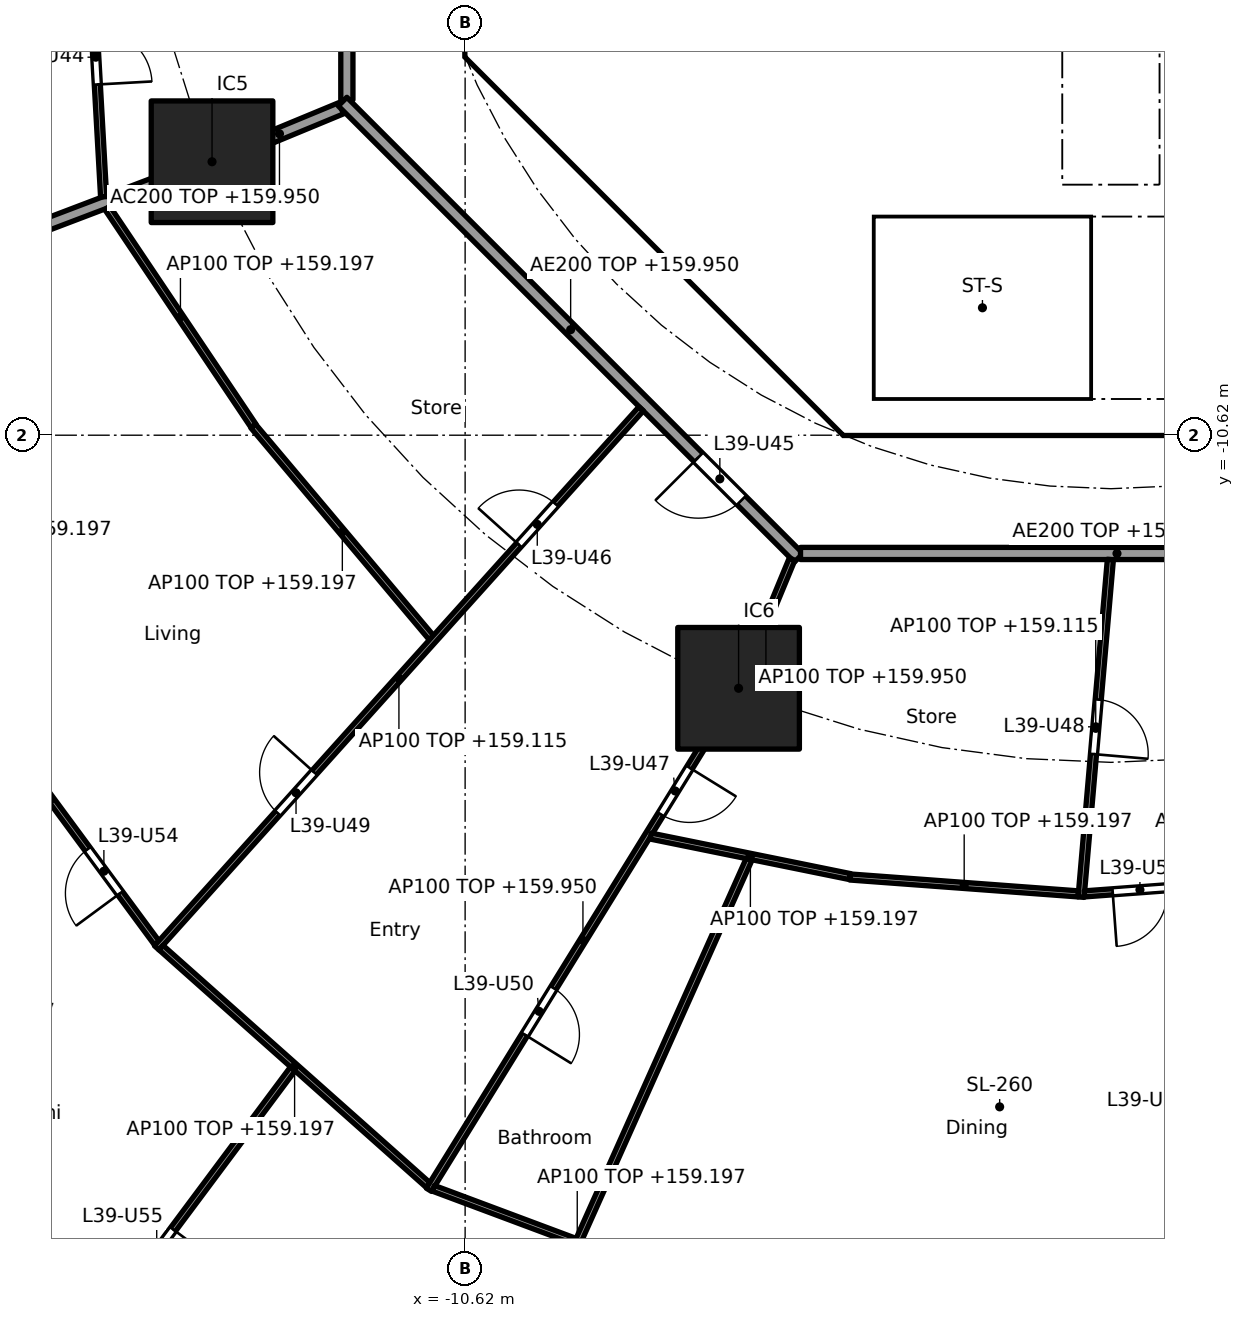
"""IFC4 building model, lengths in metres.
Left out: names, types, materials, properties, quantities, classifications, styles, units other than length and angle.
Written with IfcOpenShell. Run it as: python <this file> out.ifc"""

import sys

from ifc_helpers import new_model, si_unit, direction, frame, frame_2d, origin, origin_2d, place, context, subcontext, project, spatial, polyline, rectangle, outline, extrude, element, fill, save


model = new_model("IFC4")
c1 = context("Model", 3, precision=1e-05, world=origin(), true_north=direction((0.0, 1.0)))
c2 = subcontext(c1, "Body", "Model", "MODEL_VIEW")
j1 = project(units=[si_unit("LENGTHUNIT", "METRE"), si_unit("PLANEANGLEUNIT", "RADIAN")], contexts=[c1])
p1 = place(None, origin())
s1 = spatial("IfcSite", under=j1, at=p1, CompositionType="ELEMENT")
p2 = place(p1, origin())
s2 = spatial("IfcBuilding", under=s1, at=p2, CompositionType="ELEMENT")
p3 = place(p2, frame((0.0, 0.0, 156.6)))
s3 = spatial("IfcBuildingStorey", under=s2, at=p3, CompositionType="ELEMENT", Elevation=156.6)
for number, where, z_axis, x_axis in (
    (1, (-14.782, -6.123, 0.0), (0.0, 0.0, 1.0), (1.0, 0.0, 0.0)),
    (2, (-6.123, -14.782, 0.0), (0.0, 0.0, 1.0), (1.0, 0.0, 0.0)),
):
    element("IfcColumn", number, at=place(p3, frame(where, z_axis=z_axis, x_axis=x_axis)), inside=s3, PredefinedType="COLUMN", context=c2, shape_type="SweptSolid", body=[
        extrude(rectangle(XDim=2.0, YDim=2.0, at=origin_2d()), origin(), (0.0, 0.0, 1.0), 3.7),
    ])
p4 = place(p3, frame((-9.988, -4.613, 0.0), z_axis=(0.0, 0.0, 1.0), x_axis=(0.707106781187, -0.707106781187, 0.0)))
e3 = element("IfcWall", 3, at=p4, inside=s3, PredefinedType="SHEAR", context=c2, shape_type="SweptSolid", body=[
    extrude(rectangle(XDim=7.602, YDim=0.6, at=frame_2d((3.801, 0.0))), origin(), (0.0, 0.0, 1.0), 3.35),
])
p5 = place(p4, frame((6.151, 0.0, 0.0)))
e4 = element("IfcOpeningElement", 4, at=p5, cuts=e3, PredefinedType="OPENING", context=c2, shape_type="SweptSolid", body=[
    extrude(rectangle(XDim=1.1, YDim=2.1, at=frame_2d((0.55, 1.05))), frame((0.0, 0.31, 0.0), z_axis=(0.0, -1.0, 0.0), x_axis=(1.0, 0.0, 0.0)), (0.0, 0.0, 1.0), 0.62),
])
p6 = place(p3, frame((-7.4, -6.627, 0.0), z_axis=(0.0, 0.0, 1.0), x_axis=(0.0, 1.0, 0.0)))
e5 = element("IfcWall", 5, at=p6, inside=s3, PredefinedType="PARTITIONING", context=c2, shape_type="SweptSolid", body=[
    extrude(rectangle(XDim=2.527, YDim=0.15, at=frame_2d((1.263, 0.0))), origin(), (0.0, 0.0, 1.0), 3.35),
])
p7 = place(p6, frame((0.776, 0.0, 0.0)))
e6 = element("IfcOpeningElement", 6, at=p7, cuts=e5, PredefinedType="OPENING", context=c2, shape_type="SweptSolid", body=[
    extrude(rectangle(XDim=0.9, YDim=2.1, at=frame_2d((0.45, 1.05))), frame((0.0, 0.085, 0.0), z_axis=(0.0, -1.0, 0.0), x_axis=(1.0, 0.0, 0.0)), (0.0, 0.0, 1.0), 0.17),
])
p8 = place(p3, frame((-4.0, -6.5, 0.0), z_axis=(0.0, 0.0, 1.0), x_axis=(0.0, 1.0, 0.0)))
e7 = element("IfcWall", 7, at=p8, inside=s3, PredefinedType="SOLIDWALL", context=c2, shape_type="SweptSolid", body=[
    extrude(rectangle(XDim=2.2, YDim=0.2, at=frame_2d((1.1, 0.0))), origin(), (0.0, 0.0, 1.0), 3.35),
])
p9 = place(p8, frame((0.65, 0.0, 0.0)))
e8 = element("IfcOpeningElement", 8, at=p9, cuts=e7, PredefinedType="OPENING", context=c2, shape_type="SweptSolid", body=[
    extrude(rectangle(XDim=0.9, YDim=2.1, at=frame_2d((0.45, 1.05))), frame((0.0, 0.11, 0.0), z_axis=(0.0, -1.0, 0.0), x_axis=(1.0, 0.0, 0.0)), (0.0, 0.0, 1.0), 0.22),
])
p10 = place(p3, origin())
e9 = element("IfcWall", 9, at=p10, inside=s3, PredefinedType="SHEAR", context=c2, shape_type="SweptSolid", body=[
    extrude(outline(polyline([(-10.625, -3.801), (-10.025, -3.801), (-10.025, -4.152), (-9.776, -4.401), (-10.2, -4.825), (-10.625, -4.401), (-10.625, -3.801)])), origin(), (0.0, 0.0, 1.0), 3.35),
])
p11 = place(p3, origin())
e10 = element("IfcWall", 10, at=p11, inside=s3, PredefinedType="SHEAR", context=c2, shape_type="SweptSolid", body=[
    extrude(outline(polyline([(-4.152, -10.025), (4.152, -10.025), (4.401, -9.776), (4.825, -10.2), (4.401, -10.625), (-4.401, -10.625), (-4.825, -10.2), (-4.401, -9.776), (-4.152, -10.025)])), origin(), (0.0, 0.0, 1.0), 3.35),
])
for number, where, z_axis, x_axis in (
    (11, (-0.9, -6.5, 0.0), (0.0, 0.0, 1.0), (0.0, 1.0, 0.0)),
    (12, (0.9, -6.5, 0.0), (0.0, 0.0, 1.0), (0.0, 1.0, 0.0)),
):
    element("IfcWall", number, at=place(p3, frame(where, z_axis=z_axis, x_axis=x_axis)), inside=s3, PredefinedType="SOLIDWALL", context=c2, shape_type="SweptSolid", body=[
        extrude(rectangle(XDim=2.2, YDim=0.2, at=frame_2d((1.1, 0.0))), origin(), (0.0, 0.0, 1.0), 3.35),
    ])
p12 = place(p3, origin())
e13 = element("IfcWall", 13, at=p12, inside=s3, PredefinedType="SOLIDWALL", context=c2, shape_type="SweptSolid", body=[
    extrude(outline(polyline([(-3.9, -10.025), (-4.1, -10.025), (-4.1, -7.025), (-3.9, -7.025), (-3.9, -10.025)])), origin(), (0.0, 0.0, 1.0), 3.35),
])
p13 = place(p3, origin())
e14 = element("IfcWall", 14, at=p13, inside=s3, PredefinedType="SOLIDWALL", context=c2, shape_type="SweptSolid", body=[
    extrude(outline(polyline([(4.1, -7.025), (-4.1, -7.025), (-4.1, -6.5), (4.1, -6.5), (4.1, -7.025)])), origin(), (0.0, 0.0, 1.0), 3.35),
])
p14 = place(p3, frame((-12.657, -5.243, 0.0), z_axis=(0.0, 0.0, 1.0), x_axis=(-0.923859888513, -0.38273085373, 0.0)))
e15 = element("IfcWall", 15, at=p14, inside=s3, PredefinedType="PARTITIONING", context=c2, shape_type="SweptSolid", body=[
    extrude(rectangle(XDim=2.199, YDim=0.2, at=frame_2d((1.1, 0.0))), origin(), (0.0, 0.0, 1.0), 3.35),
])
p15 = place(p3, frame((-14.829, -6.141, 0.0), z_axis=(0.0, 0.0, 1.0), x_axis=(-0.93470181966, -0.355432846433, 0.0)))
e16 = element("IfcWall", 16, at=p15, inside=s3, PredefinedType="PARTITIONING", context=c2, shape_type="SweptSolid", body=[
    extrude(rectangle(XDim=12.438, YDim=0.2, at=frame_2d((6.219, 0.0))), origin(), (0.0, 0.0, 1.0), 2.597),
])
p16 = place(p3, frame((-12.565, 5.304, 0.0), z_axis=(0.0, 0.0, 1.0), x_axis=(0.0, -1.0, 0.0)))
e17 = element("IfcWall", 17, at=p16, inside=s3, PredefinedType="PARTITIONING", context=c2, shape_type="SweptSolid", body=[
    extrude(rectangle(XDim=10.409, YDim=0.2, at=frame_2d((5.205, 0.0))), origin(), (0.0, 0.0, 1.0), 3.35),
])
p17 = place(p3, frame((-12.635, -5.134, 0.0), z_axis=(0.0, 0.0, 1.0), x_axis=(0.707106781187, -0.707106781187, 0.0)))
e18 = element("IfcWall", 18, at=p17, inside=s3, PredefinedType="PARTITIONING", context=c2, shape_type="SweptSolid", body=[
    extrude(rectangle(XDim=10.609, YDim=0.2, at=frame_2d((5.305, 0.0))), origin(), (0.0, 0.0, 1.0), 3.35),
])
p18 = place(p17, frame((8.274, 0.0, 0.0)))
e19 = element("IfcOpeningElement", 19, at=p18, cuts=e18, PredefinedType="OPENING", context=c2, shape_type="SweptSolid", body=[
    extrude(rectangle(XDim=1.0, YDim=2.1, at=frame_2d((0.5, 1.05))), frame((0.0, 0.11, 0.0), z_axis=(0.0, -1.0, 0.0), x_axis=(1.0, 0.0, 0.0)), (0.0, 0.0, 1.0), 0.22),
])
p19 = place(p3, frame((-5.104, -12.565, 0.0), z_axis=(0.0, 0.0, 1.0), x_axis=(1.0, 0.0, 0.0)))
e20 = element("IfcWall", 20, at=p19, inside=s3, PredefinedType="PARTITIONING", context=c2, shape_type="SweptSolid", body=[
    extrude(rectangle(XDim=10.409, YDim=0.2, at=frame_2d((5.205, 0.0))), origin(), (0.0, 0.0, 1.0), 3.35),
])
p20 = place(p3, frame((-16.825, -2.058, 0.0), z_axis=(0.0, 0.0, 1.0), x_axis=(0.055993664681, -0.998431124072, 0.0)))
e21 = element("IfcWall", 21, at=p20, inside=s3, PredefinedType="PARTITIONING", context=c2, shape_type="SweptSolid", body=[
    extrude(rectangle(XDim=4.648, YDim=0.1, at=frame_2d((2.324, 0.0))), origin(), (0.0, 0.0, 1.0), 2.597),
])
p21 = place(p20, frame((1.899, 0.0, 0.0)))
e22 = element("IfcOpeningElement", 22, at=p21, cuts=e21, PredefinedType="OPENING", context=c2, shape_type="SweptSolid", body=[
    extrude(rectangle(XDim=0.9, YDim=2.1, at=frame_2d((0.45, 1.05))), frame((0.0, 0.06, 0.0), z_axis=(0.0, -1.0, 0.0), x_axis=(1.0, 0.0, 0.0)), (0.0, 0.0, 1.0), 0.12),
])
p22 = place(p3, frame((-16.504, -6.882, 0.0), z_axis=(0.0, 0.0, 1.0), x_axis=(0.556995256876, -0.830515673433, 0.0)))
e23 = element("IfcWall", 23, at=p22, inside=s3, PredefinedType="PARTITIONING", context=c2, shape_type="SweptSolid", body=[
    extrude(rectangle(XDim=4.317, YDim=0.1, at=frame_2d((2.158, 0.0))), origin(), (0.0, 0.0, 1.0), 2.597),
])
p23 = place(p3, frame((-14.104, -10.47, 0.0), z_axis=(0.0, 0.0, 1.0), x_axis=(0.644051444483, -0.764982180746, 0.0)))
e24 = element("IfcWall", 24, at=p23, inside=s3, PredefinedType="PARTITIONING", context=c2, shape_type="SweptSolid", body=[
    extrude(rectangle(XDim=4.548, YDim=0.1, at=frame_2d((2.274, 0.0))), origin(), (0.0, 0.0, 1.0), 2.597),
])
p24 = place(p3, frame((-19.176, -14.244, 0.0), z_axis=(0.0, 0.0, 1.0), x_axis=(0.593532053206, -0.80481035146, 0.0)))
e25 = element("IfcWall", 25, at=p24, inside=s3, PredefinedType="PARTITIONING", context=c2, shape_type="SweptSolid", body=[
    extrude(rectangle(XDim=5.876, YDim=0.1, at=frame_2d((2.938, 0.0))), origin(), (0.0, 0.0, 1.0), 2.597),
])
p25 = place(p24, frame((3.957, 0.0, 0.0)))
e26 = element("IfcOpeningElement", 26, at=p25, cuts=e25, PredefinedType="OPENING", context=c2, shape_type="SweptSolid", body=[
    extrude(rectangle(XDim=0.9, YDim=2.1, at=frame_2d((0.45, 1.05))), frame((0.0, 0.06, 0.0), z_axis=(0.0, -1.0, 0.0), x_axis=(1.0, 0.0, 0.0)), (0.0, 0.0, 1.0), 0.12),
])
p26 = place(p3, frame((-7.725, -10.186, 0.0), z_axis=(0.0, 0.0, 1.0), x_axis=(-0.668498346565, -0.743713628112, 0.0)))
e27 = element("IfcWall", 27, at=p26, inside=s3, PredefinedType="PARTITIONING", context=c2, shape_type="SweptSolid", body=[
    extrude(rectangle(XDim=11.919, YDim=0.1, at=frame_2d((5.959, 0.0))), origin(), (0.0, 0.0, 1.0), 2.515),
])
p27 = place(p26, frame((2.106, 0.0, 0.0)))
e28 = element("IfcOpeningElement", 28, at=p27, cuts=e27, PredefinedType="OPENING", context=c2, shape_type="SweptSolid", body=[
    extrude(rectangle(XDim=0.9, YDim=2.1, at=frame_2d((0.45, 1.05))), frame((0.0, 0.06, 0.0), z_axis=(0.0, -1.0, 0.0), x_axis=(1.0, 0.0, 0.0)), (0.0, 0.0, 1.0), 0.12),
])
p28 = place(p26, frame((8.041, 0.0, 0.0)))
e29 = element("IfcOpeningElement", 29, at=p28, cuts=e27, PredefinedType="OPENING", context=c2, shape_type="SweptSolid", body=[
    extrude(rectangle(XDim=0.9, YDim=2.1, at=frame_2d((0.45, 1.05))), frame((0.0, 0.06, 0.0), z_axis=(0.0, -1.0, 0.0), x_axis=(1.0, 0.0, 0.0)), (0.0, 0.0, 1.0), 0.12),
])
p29 = place(p3, frame((-15.622, -19.046, 0.0), z_axis=(0.0, 0.0, 1.0), x_axis=(0.747342891849, -0.664438561496, 0.0)))
e30 = element("IfcWall", 30, at=p29, inside=s3, PredefinedType="PARTITIONING", context=c2, shape_type="SweptSolid", body=[
    extrude(rectangle(XDim=5.881, YDim=0.1, at=frame_2d((2.94, 0.0))), origin(), (0.0, 0.0, 1.0), 2.597),
])
p30 = place(p3, frame((-13.454, -21.04, 0.0), z_axis=(0.0, 0.0, 1.0), x_axis=(-0.597848033124, -0.801609461826, 0.0)))
e31 = element("IfcWall", 31, at=p30, inside=s3, PredefinedType="PARTITIONING", context=c2, shape_type="SweptSolid", body=[
    extrude(rectangle(XDim=7.486, YDim=0.1, at=frame_2d((3.743, 0.0))), origin(), (0.0, 0.0, 1.0), 2.747),
])
p31 = place(p30, frame((3.293, 0.0, 0.0)))
e32 = element("IfcOpeningElement", 32, at=p31, cuts=e31, PredefinedType="OPENING", context=c2, shape_type="SweptSolid", body=[
    extrude(rectangle(XDim=0.9, YDim=2.1, at=frame_2d((0.45, 1.05))), frame((0.0, 0.06, 0.0), z_axis=(0.0, -1.0, 0.0), x_axis=(1.0, 0.0, 0.0)), (0.0, 0.0, 1.0), 0.12),
])
p32 = place(p3, frame((-5.243, -12.657, 0.0), z_axis=(0.0, 0.0, 1.0), x_axis=(-0.382811769845, -0.923826362943, 0.0)))
e33 = element("IfcWall", 33, at=p32, inside=s3, PredefinedType="PARTITIONING", context=c2, shape_type="SweptSolid", body=[
    extrude(rectangle(XDim=2.25, YDim=0.1, at=frame_2d((1.125, 0.0))), origin(), (0.0, 0.0, 1.0), 3.35),
])
p33 = place(p3, frame((-6.149, -14.825, 0.0), z_axis=(0.0, 0.0, 1.0), x_axis=(-0.525396393596, -0.850857584791, 0.0)))
e34 = element("IfcWall", 34, at=p33, inside=s3, PredefinedType="PARTITIONING", context=c2, shape_type="SweptSolid", body=[
    extrude(rectangle(XDim=9.643, YDim=0.1, at=frame_2d((4.822, 0.0))), origin(), (0.0, 0.0, 1.0), 3.35),
])
p34 = place(p33, frame((1.485, 0.0, 0.0)))
e35 = element("IfcOpeningElement", 35, at=p34, cuts=e34, PredefinedType="OPENING", context=c2, shape_type="SweptSolid", body=[
    extrude(rectangle(XDim=0.9, YDim=2.1, at=frame_2d((0.45, 1.05))), frame((0.0, 0.06, 0.0), z_axis=(0.0, -1.0, 0.0), x_axis=(1.0, 0.0, 0.0)), (0.0, 0.0, 1.0), 0.12),
])
p35 = place(p33, frame((5.744, 0.0, 0.0)))
e36 = element("IfcOpeningElement", 36, at=p35, cuts=e34, PredefinedType="OPENING", context=c2, shape_type="SweptSolid", body=[
    extrude(rectangle(XDim=0.9, YDim=2.1, at=frame_2d((0.45, 1.05))), frame((0.0, 0.06, 0.0), z_axis=(0.0, -1.0, 0.0), x_axis=(1.0, 0.0, 0.0)), (0.0, 0.0, 1.0), 0.12),
])
p36 = place(p3, frame((-7.568, -17.212, 0.0), z_axis=(0.0, 0.0, 1.0), x_axis=(0.979967079473, -0.199159541946, 0.0)))
e37 = element("IfcWall", 37, at=p36, inside=s3, PredefinedType="PARTITIONING", context=c2, shape_type="SweptSolid", body=[
    extrude(rectangle(XDim=3.347, YDim=0.1, at=frame_2d((1.673, 0.0))), origin(), (0.0, 0.0, 1.0), 2.597),
])
p37 = place(p3, frame((-11.143, -23.004, 0.0), z_axis=(0.0, 0.0, 1.0), x_axis=(0.936721765635, -0.350074754567, 0.0)))
e38 = element("IfcWall", 38, at=p37, inside=s3, PredefinedType="PARTITIONING", context=c2, shape_type="SweptSolid", body=[
    extrude(rectangle(XDim=5.053, YDim=0.1, at=frame_2d((2.526, 0.0))), origin(), (0.0, 0.0, 1.0), 2.597),
])
p38 = place(p3, frame((-5.949, -17.591, 0.0), z_axis=(0.0, 0.0, 1.0), x_axis=(-0.40838467696, -0.912809923053, 0.0)))
e39 = element("IfcWall", 39, at=p38, inside=s3, PredefinedType="PARTITIONING", context=c2, shape_type="SweptSolid", body=[
    extrude(rectangle(XDim=14.665, YDim=0.1, at=frame_2d((7.333, 0.0))), origin(), (0.0, 0.0, 1.0), 2.747),
])
p39 = place(p3, frame((-4.29, -17.885, 0.0), z_axis=(0.0, 0.0, 1.0), x_axis=(0.997272353708, -0.073809569363, 0.0)))
e40 = element("IfcWall", 40, at=p39, inside=s3, PredefinedType="PARTITIONING", context=c2, shape_type="SweptSolid", body=[
    extrude(rectangle(XDim=3.764, YDim=0.1, at=frame_2d((1.882, 0.0))), origin(), (0.0, 0.0, 1.0), 2.597),
])
p40 = place(p3, frame((-0.009, -12.664, 0.0), z_axis=(0.0, 0.0, 1.0), x_axis=(-0.086431127211, -0.9962578282, 0.0)))
e41 = element("IfcWall", 41, at=p40, inside=s3, PredefinedType="PARTITIONING", context=c2, shape_type="SweptSolid", body=[
    extrude(rectangle(XDim=5.573, YDim=0.1, at=frame_2d((2.787, 0.0))), origin(), (0.0, 0.0, 1.0), 2.515),
])
p41 = place(p40, frame((2.312, 0.0, 0.0)))
e42 = element("IfcOpeningElement", 42, at=p41, cuts=e41, PredefinedType="OPENING", context=c2, shape_type="SweptSolid", body=[
    extrude(rectangle(XDim=0.9, YDim=2.1, at=frame_2d((0.45, 1.05))), frame((0.0, 0.06, 0.0), z_axis=(0.0, -1.0, 0.0), x_axis=(1.0, 0.0, 0.0)), (0.0, 0.0, 1.0), 0.12),
])
p42 = place(p3, frame((-0.436, -18.163, 0.0), z_axis=(0.0, 0.0, 1.0), x_axis=(0.997271025958, 0.073827506966, 0.0)))
e43 = element("IfcWall", 43, at=p42, inside=s3, PredefinedType="PARTITIONING", context=c2, shape_type="SweptSolid", body=[
    extrude(rectangle(XDim=3.664, YDim=0.1, at=frame_2d((1.832, 0.0))), origin(), (0.0, 0.0, 1.0), 2.597),
])
p43 = place(p42, frame((0.466, 0.0, 0.0)))
e44 = element("IfcOpeningElement", 44, at=p43, cuts=e43, PredefinedType="OPENING", context=c2, shape_type="SweptSolid", body=[
    extrude(rectangle(XDim=0.9, YDim=2.1, at=frame_2d((0.45, 1.05))), frame((0.0, 0.06, 0.0), z_axis=(0.0, -1.0, 0.0), x_axis=(1.0, 0.0, 0.0)), (0.0, 0.0, 1.0), 0.12),
])
p44 = place(p7, origin())
e45 = element("IfcDoor", 45, at=p44, inside=s3, OperationType="SINGLE_SWING_LEFT", PredefinedType="DOOR", context=c2, shape_type="SweptSolid", body=[
    extrude(rectangle(XDim=0.9, YDim=2.1, at=frame_2d((0.45, 1.05))), frame((0.0, 0.025, 0.0), z_axis=(0.0, -1.0, 0.0), x_axis=(1.0, 0.0, 0.0)), (0.0, 0.0, 1.0), 0.05),
])
fill(e6, e45)
p45 = place(p9, frame((0.9, 0.0, 0.0), x_axis=(-1.0, 0.0, 0.0)))
e46 = element("IfcDoor", 46, at=p45, inside=s3, OperationType="SINGLE_SWING_RIGHT", PredefinedType="DOOR", context=c2, shape_type="SweptSolid", body=[
    extrude(rectangle(XDim=0.9, YDim=2.1, at=frame_2d((0.45, 1.05))), frame((0.0, 0.025, 0.0), z_axis=(0.0, -1.0, 0.0), x_axis=(1.0, 0.0, 0.0)), (0.0, 0.0, 1.0), 0.05),
])
fill(e8, e46)
p46 = place(p5, origin())
e47 = element("IfcDoor", 47, at=p46, inside=s3, OperationType="SINGLE_SWING_LEFT", PredefinedType="DOOR", context=c2, shape_type="SweptSolid", body=[
    extrude(rectangle(XDim=1.1, YDim=2.1, at=frame_2d((0.55, 1.05))), frame((0.0, 0.025, 0.0), z_axis=(0.0, -1.0, 0.0), x_axis=(1.0, 0.0, 0.0)), (0.0, 0.0, 1.0), 0.05),
])
fill(e4, e47)
p47 = place(p21, origin())
e48 = element("IfcDoor", 48, at=p47, inside=s3, OperationType="SINGLE_SWING_RIGHT", PredefinedType="DOOR", context=c2, shape_type="SweptSolid", body=[
    extrude(rectangle(XDim=0.9, YDim=2.1, at=frame_2d((0.45, 1.05))), frame((0.0, 0.025, 0.0), z_axis=(0.0, -1.0, 0.0), x_axis=(1.0, 0.0, 0.0)), (0.0, 0.0, 1.0), 0.05),
])
fill(e22, e48)
p48 = place(p18, frame((1.0, 0.0, 0.0), x_axis=(-1.0, 0.0, 0.0)))
e49 = element("IfcDoor", 49, at=p48, inside=s3, OperationType="SINGLE_SWING_RIGHT", PredefinedType="DOOR", context=c2, shape_type="SweptSolid", body=[
    extrude(rectangle(XDim=1.0, YDim=2.1, at=frame_2d((0.5, 1.05))), frame((0.0, 0.025, 0.0), z_axis=(0.0, -1.0, 0.0), x_axis=(1.0, 0.0, 0.0)), (0.0, 0.0, 1.0), 0.05),
])
fill(e19, e49)
p49 = place(p27, frame((0.9, 0.0, 0.0), x_axis=(-1.0, 0.0, 0.0)))
e50 = element("IfcDoor", 50, at=p49, inside=s3, OperationType="SINGLE_SWING_LEFT", PredefinedType="DOOR", context=c2, shape_type="SweptSolid", body=[
    extrude(rectangle(XDim=0.9, YDim=2.1, at=frame_2d((0.45, 1.05))), frame((0.0, 0.025, 0.0), z_axis=(0.0, -1.0, 0.0), x_axis=(1.0, 0.0, 0.0)), (0.0, 0.0, 1.0), 0.05),
])
fill(e28, e50)
p50 = place(p34, origin())
e51 = element("IfcDoor", 51, at=p50, inside=s3, OperationType="SINGLE_SWING_LEFT", PredefinedType="DOOR", context=c2, shape_type="SweptSolid", body=[
    extrude(rectangle(XDim=0.9, YDim=2.1, at=frame_2d((0.45, 1.05))), frame((0.0, 0.025, 0.0), z_axis=(0.0, -1.0, 0.0), x_axis=(1.0, 0.0, 0.0)), (0.0, 0.0, 1.0), 0.05),
])
fill(e35, e51)
p51 = place(p41, origin())
e52 = element("IfcDoor", 52, at=p51, inside=s3, OperationType="SINGLE_SWING_RIGHT", PredefinedType="DOOR", context=c2, shape_type="SweptSolid", body=[
    extrude(rectangle(XDim=0.9, YDim=2.1, at=frame_2d((0.45, 1.05))), frame((0.0, 0.025, 0.0), z_axis=(0.0, -1.0, 0.0), x_axis=(1.0, 0.0, 0.0)), (0.0, 0.0, 1.0), 0.05),
])
fill(e42, e52)
p52 = place(p28, frame((0.9, 0.0, 0.0), x_axis=(-1.0, 0.0, 0.0)))
e53 = element("IfcDoor", 53, at=p52, inside=s3, OperationType="SINGLE_SWING_RIGHT", PredefinedType="DOOR", context=c2, shape_type="SweptSolid", body=[
    extrude(rectangle(XDim=0.9, YDim=2.1, at=frame_2d((0.45, 1.05))), frame((0.0, 0.025, 0.0), z_axis=(0.0, -1.0, 0.0), x_axis=(1.0, 0.0, 0.0)), (0.0, 0.0, 1.0), 0.05),
])
fill(e29, e53)
p53 = place(p35, origin())
e54 = element("IfcDoor", 54, at=p53, inside=s3, OperationType="SINGLE_SWING_RIGHT", PredefinedType="DOOR", context=c2, shape_type="SweptSolid", body=[
    extrude(rectangle(XDim=0.9, YDim=2.1, at=frame_2d((0.45, 1.05))), frame((0.0, 0.025, 0.0), z_axis=(0.0, -1.0, 0.0), x_axis=(1.0, 0.0, 0.0)), (0.0, 0.0, 1.0), 0.05),
])
fill(e36, e54)
p54 = place(p43, frame((0.9, 0.0, 0.0), x_axis=(-1.0, 0.0, 0.0)))
e55 = element("IfcDoor", 55, at=p54, inside=s3, OperationType="SINGLE_SWING_RIGHT", PredefinedType="DOOR", context=c2, shape_type="SweptSolid", body=[
    extrude(rectangle(XDim=0.9, YDim=2.1, at=frame_2d((0.45, 1.05))), frame((0.0, 0.025, 0.0), z_axis=(0.0, -1.0, 0.0), x_axis=(1.0, 0.0, 0.0)), (0.0, 0.0, 1.0), 0.05),
])
fill(e44, e55)
p55 = place(p25, frame((0.9, 0.0, 0.0), x_axis=(-1.0, 0.0, 0.0)))
e56 = element("IfcDoor", 56, at=p55, inside=s3, OperationType="SINGLE_SWING_LEFT", PredefinedType="DOOR", context=c2, shape_type="SweptSolid", body=[
    extrude(rectangle(XDim=0.9, YDim=2.1, at=frame_2d((0.45, 1.05))), frame((0.0, 0.025, 0.0), z_axis=(0.0, -1.0, 0.0), x_axis=(1.0, 0.0, 0.0)), (0.0, 0.0, 1.0), 0.05),
])
fill(e26, e56)
p56 = place(p31, origin())
e57 = element("IfcDoor", 57, at=p56, inside=s3, OperationType="SINGLE_SWING_LEFT", PredefinedType="DOOR", context=c2, shape_type="SweptSolid", body=[
    extrude(rectangle(XDim=0.9, YDim=2.1, at=frame_2d((0.45, 1.05))), frame((0.0, 0.025, 0.0), z_axis=(0.0, -1.0, 0.0), x_axis=(1.0, 0.0, 0.0)), (0.0, 0.0, 1.0), 0.05),
])
fill(e32, e57)
save(model, sys.argv[1])
